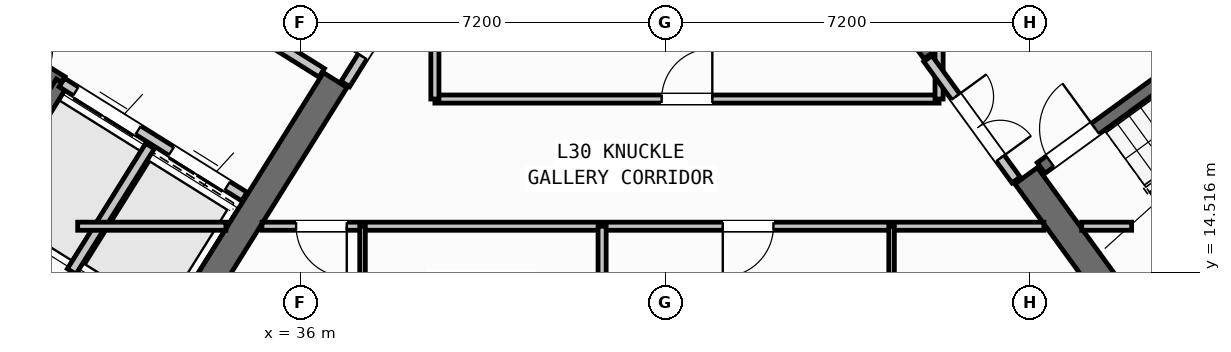
"""IFC4 building model, lengths in metres.
Left out: names, types, materials, properties, quantities, classifications, styles, units other than length and angle.
Written with IfcOpenShell. Run it as: python <this file> out.ifc"""

import sys

from ifc_helpers import new_model, si_unit, direction, frame, frame_2d, origin, place, context, subcontext, project, spatial, rectangle, extrude, source, transform, mapped, element, fill, save


model = new_model("IFC4")
c1 = context("Model", 3, precision=1e-05, world=origin(), true_north=direction((0.0, 1.0)))
c2 = subcontext(c1, "Body", "Model", "MODEL_VIEW")
j1 = project(units=[si_unit("LENGTHUNIT", "METRE"), si_unit("PLANEANGLEUNIT", "RADIAN")], contexts=[c1])
p1 = place(None, origin())
s1 = spatial("IfcSite", under=j1, at=p1, CompositionType="ELEMENT")
p2 = place(p1, origin())
s2 = spatial("IfcBuilding", under=s1, at=p2, CompositionType="ELEMENT")
p3 = place(p2, frame((0.0, 0.0, 119.7)))
s3 = spatial("IfcBuildingStorey", under=s2, at=p3, CompositionType="ELEMENT", Elevation=119.7)
p4 = place(p3, frame((33.366, 12.477, 0.0), z_axis=(0.0, 0.0, 1.0), x_axis=(-0.848047359947, 0.529920442413, 0.0)))
e1 = element("IfcWall", 1, at=p4, inside=s3, PredefinedType="SHEAR", context=c2, shape_type="SweptSolid", body=[
    extrude(rectangle(XDim=13.14, YDim=0.55, at=frame_2d((6.57, 0.0))), origin(), (0.0, 0.0, 1.0), 3.35),
])
p5 = place(p3, frame((36.683, 18.304, 0.0), z_axis=(0.0, 0.0, 1.0), x_axis=(-0.529896466841, -0.848062341122, 0.0)))
e2 = element("IfcWall", 2, at=p5, inside=s3, PredefinedType="SHEAR", context=c2, shape_type="SweptSolid", body=[
    extrude(rectangle(XDim=6.425, YDim=0.55, at=frame_2d((3.212, 0.0))), origin(), (0.0, 0.0, 1.0), 3.35),
])
p6 = place(p3, frame((52.359, 13.14, 0.0), z_axis=(0.0, 0.0, 1.0), x_axis=(0.809014896919, 0.587788139183, 0.0)))
e3 = element("IfcWall", 3, at=p6, inside=s3, PredefinedType="SHEAR", context=c2, shape_type="SweptSolid", body=[
    extrude(rectangle(XDim=12.34, YDim=0.55, at=frame_2d((6.17, 0.0))), origin(), (0.0, 0.0, 1.0), 3.35),
])
p7 = place(p3, frame((52.42, 13.524, 0.0), z_axis=(0.0, 0.0, 1.0), x_axis=(-0.587802113096, 0.809004744015, 0.0)))
e4 = element("IfcWall", 4, at=p7, inside=s3, PredefinedType="SHEAR", context=c2, shape_type="SweptSolid", body=[
    extrude(rectangle(XDim=3.575, YDim=0.55, at=frame_2d((1.788, 0.0))), origin(), (0.0, 0.0, 1.0), 3.35),
])
p8 = place(p3, frame((48.526, 18.884, 0.0), z_axis=(0.0, 0.0, 1.0), x_axis=(-0.587764933797, 0.809031756236, 0.0)))
e5 = element("IfcWall", 5, at=p8, inside=s3, PredefinedType="SHEAR", context=c2, shape_type="SweptSolid", body=[
    extrude(rectangle(XDim=6.425, YDim=0.55, at=frame_2d((3.212, 0.0))), origin(), (0.0, 0.0, 1.0), 3.35),
])
p9 = place(p3, frame((31.76, 12.183, 0.0), z_axis=(0.0, 0.0, 1.0), x_axis=(-0.848047074256, 0.529920899612, 0.0)))
e6 = element("IfcWall", 6, at=p9, inside=s3, PredefinedType="STANDARD", context=c2, shape_type="SweptSolid", body=[
    extrude(rectangle(XDim=30.652, YDim=0.32, at=frame_2d((15.326, 0.0))), origin(), (0.0, 0.0, 1.0), 3.35),
])
p10 = place(p9, frame((15.153, 0.0, 0.0)))
e7 = element("IfcOpeningElement", 7, at=p10, cuts=e6, PredefinedType="OPENING", context=c2, shape_type="SweptSolid", body=[
    extrude(rectangle(XDim=1.2, YDim=2.15, at=frame_2d((0.6, 1.075))), frame((0.0, 0.17, 0.0), z_axis=(0.0, -1.0, 0.0), x_axis=(1.0, 0.0, 0.0)), (0.0, 0.0, 1.0), 0.34),
])
p11 = place(p9, frame((2.002, 0.0, 0.8)))
e8 = element("IfcOpeningElement", 8, at=p11, cuts=e6, PredefinedType="OPENING", context=c2, shape_type="SweptSolid", body=[
    extrude(rectangle(XDim=2.1, YDim=1.55, at=frame_2d((1.05, 0.775))), frame((0.0, 0.17, 0.0), z_axis=(0.0, -1.0, 0.0), x_axis=(1.0, 0.0, 0.0)), (0.0, 0.0, 1.0), 0.34),
])
p12 = place(p9, frame((7.206, 0.0, 0.8)))
e9 = element("IfcOpeningElement", 9, at=p12, cuts=e6, PredefinedType="OPENING", context=c2, shape_type="SweptSolid", body=[
    extrude(rectangle(XDim=2.1, YDim=1.55, at=frame_2d((1.05, 0.775))), frame((0.0, 0.17, 0.0), z_axis=(0.0, -1.0, 0.0), x_axis=(1.0, 0.0, 0.0)), (0.0, 0.0, 1.0), 0.34),
])
p13 = place(p9, frame((12.648, 0.0, 1.0)))
e10 = element("IfcOpeningElement", 10, at=p13, cuts=e6, PredefinedType="OPENING", context=c2, shape_type="SweptSolid", body=[
    extrude(rectangle(XDim=0.9, YDim=1.25, at=frame_2d((0.45, 0.625))), frame((0.0, 0.17, 0.0), z_axis=(0.0, -1.0, 0.0), x_axis=(1.0, 0.0, 0.0)), (0.0, 0.0, 1.0), 0.34),
])
p14 = place(p9, frame((19.458, 0.0, 0.95)))
e11 = element("IfcOpeningElement", 11, at=p14, cuts=e6, PredefinedType="OPENING", context=c2, shape_type="SweptSolid", body=[
    extrude(rectangle(XDim=1.2, YDim=1.4, at=frame_2d((0.6, 0.7))), frame((0.0, 0.17, 0.0), z_axis=(0.0, -1.0, 0.0), x_axis=(1.0, 0.0, 0.0)), (0.0, 0.0, 1.0), 0.34),
])
p15 = place(p9, frame((21.858, 0.0, 0.95)))
e12 = element("IfcOpeningElement", 12, at=p15, cuts=e6, PredefinedType="OPENING", context=c2, shape_type="SweptSolid", body=[
    extrude(rectangle(XDim=1.2, YDim=1.4, at=frame_2d((0.6, 0.7))), frame((0.0, 0.17, 0.0), z_axis=(0.0, -1.0, 0.0), x_axis=(1.0, 0.0, 0.0)), (0.0, 0.0, 1.0), 0.34),
])
p16 = place(p9, frame((27.266, 0.0, 0.8)))
e13 = element("IfcOpeningElement", 13, at=p16, cuts=e6, PredefinedType="OPENING", context=c2, shape_type="SweptSolid", body=[
    extrude(rectangle(XDim=2.1, YDim=1.55, at=frame_2d((1.05, 0.775))), frame((0.0, 0.17, 0.0), z_axis=(0.0, -1.0, 0.0), x_axis=(1.0, 0.0, 0.0)), (0.0, 0.0, 1.0), 0.34),
])
p17 = place(p3, frame((31.28, 18.261, 0.0), z_axis=(0.0, 0.0, 1.0), x_axis=(-0.848051618787, 0.529913626805, 0.0)))
e14 = element("IfcWall", 14, at=p17, inside=s3, PredefinedType="SHEAR", context=c2, shape_type="SweptSolid", body=[
    extrude(rectangle(XDim=7.46, YDim=0.26, at=frame_2d((3.73, 0.0))), origin(), (0.0, 0.0, 1.0), 3.35),
])
p18 = place(p17, frame((0.36, 0.0, 0.0)))
e15 = element("IfcOpeningElement", 15, at=p18, cuts=e14, PredefinedType="OPENING", context=c2, shape_type="SweptSolid", body=[
    extrude(rectangle(XDim=0.86, YDim=2.05, at=frame_2d((0.43, 1.025))), frame((0.0, 0.14, 0.0), z_axis=(0.0, -1.0, 0.0), x_axis=(1.0, 0.0, 0.0)), (0.0, 0.0, 1.0), 0.28),
])
p19 = place(p3, frame((31.288, 18.256, 0.0), z_axis=(0.0, 0.0, 1.0), x_axis=(-0.529943379326, -0.848033026897, 0.0)))
e16 = element("IfcWall", 16, at=p19, inside=s3, PredefinedType="SHEAR", context=c2, shape_type="SweptSolid", body=[
    extrude(rectangle(XDim=3.16, YDim=0.26, at=frame_2d((1.58, 0.0))), origin(), (0.0, 0.0, 1.0), 3.35),
])
p20 = place(p3, frame((34.891, 16.005, 0.0), z_axis=(0.0, 0.0, 1.0), x_axis=(-0.848062873452, 0.529895614884, 0.0)))
e17 = element("IfcWall", 17, at=p20, inside=s3, PredefinedType="STANDARD", context=c2, shape_type="SweptSolid", body=[
    extrude(rectangle(XDim=4.248, YDim=0.2, at=frame_2d((2.124, 0.0))), origin(), (0.0, 0.0, 1.0), 3.34),
])
p21 = place(p20, frame((0.398, 0.0, 0.0)))
e18 = element("IfcOpeningElement", 18, at=p21, cuts=e17, PredefinedType="OPENING", context=c2, shape_type="SweptSolid", body=[
    extrude(rectangle(XDim=1.3, YDim=2.2, at=frame_2d((0.65, 1.1))), frame((0.0, 0.11, 0.0), z_axis=(0.0, -1.0, 0.0), x_axis=(1.0, 0.0, 0.0)), (0.0, 0.0, 1.0), 0.22),
])
p22 = place(p20, frame((2.473, 0.0, 0.0)))
e19 = element("IfcOpeningElement", 19, at=p22, cuts=e17, PredefinedType="OPENING", context=c2, shape_type="SweptSolid", body=[
    extrude(rectangle(XDim=1.45, YDim=2.25, at=frame_2d((0.725, 1.125))), frame((0.0, 0.11, 0.0), z_axis=(0.0, -1.0, 0.0), x_axis=(1.0, 0.0, 0.0)), (0.0, 0.0, 1.0), 0.22),
])
p23 = place(p3, frame((36.417, 18.447, 0.0), z_axis=(0.0, 0.0, 1.0), x_axis=(-0.848064879198, 0.529892404805, 0.0)))
e20 = element("IfcWall", 20, at=p23, inside=s3, PredefinedType="STANDARD", context=c2, shape_type="SweptSolid", body=[
    extrude(rectangle(XDim=5.768, YDim=0.2, at=frame_2d((2.884, 0.0))), origin(), (0.0, 0.0, 1.0), 3.34),
])
p24 = place(p23, frame((2.548, 0.0, 0.0)))
e21 = element("IfcOpeningElement", 21, at=p24, cuts=e20, PredefinedType="OPENING", context=c2, shape_type="SweptSolid", body=[
    extrude(rectangle(XDim=1.15, YDim=2.1, at=frame_2d((0.575, 1.05))), frame((0.0, 0.11, 0.0), z_axis=(0.0, -1.0, 0.0), x_axis=(1.0, 0.0, 0.0)), (0.0, 0.0, 1.0), 0.22),
])
p25 = place(p3, frame((33.029, 17.003, 0.0), z_axis=(0.0, 0.0, 1.0), x_axis=(-0.529916267533, -0.848049968695, 0.0)))
e22 = element("IfcWall", 22, at=p25, inside=s3, PredefinedType="STANDARD", context=c2, shape_type="SweptSolid", body=[
    extrude(rectangle(XDim=2.92, YDim=0.2, at=frame_2d((1.46, 0.0))), origin(), (0.0, 0.0, 1.0), 3.34),
])
p26 = place(p3, frame((52.472, 14.013, 0.0), z_axis=(0.0, 0.0, 1.0), x_axis=(0.809028366311, 0.587769599847, 0.0)))
e23 = element("IfcWall", 23, at=p26, inside=s3, PredefinedType="SHEAR", context=c2, shape_type="SweptSolid", body=[
    extrude(rectangle(XDim=7.33, YDim=0.26, at=frame_2d((3.665, 0.0))), origin(), (0.0, 0.0, 1.0), 3.35),
])
p27 = place(p3, frame((50.615, 16.57, 0.0), z_axis=(0.0, 0.0, 1.0), x_axis=(0.809028366311, 0.587769599847, 0.0)))
e24 = element("IfcWall", 24, at=p27, inside=s3, PredefinedType="SHEAR", context=c2, shape_type="SweptSolid", body=[
    extrude(rectangle(XDim=7.33, YDim=0.26, at=frame_2d((3.665, 0.0))), origin(), (0.0, 0.0, 1.0), 3.35),
])
p28 = place(p27, frame((0.22, 0.0, 0.0)))
e25 = element("IfcOpeningElement", 25, at=p28, cuts=e24, PredefinedType="OPENING", context=c2, shape_type="SweptSolid", body=[
    extrude(rectangle(XDim=1.1, YDim=2.1, at=frame_2d((0.55, 1.05))), frame((0.0, 0.14, 0.0), z_axis=(0.0, -1.0, 0.0), x_axis=(1.0, 0.0, 0.0)), (0.0, 0.0, 1.0), 0.28),
])
p29 = place(p3, frame((38.451, 20.737, 0.0), z_axis=(0.0, 0.0, 1.0), x_axis=(-0.529924799939, -0.848044637038, 0.0)))
e26 = element("IfcWall", 26, at=p29, inside=s3, PredefinedType="STANDARD", context=c2, shape_type="SweptSolid", body=[
    extrude(rectangle(XDim=2.96, YDim=0.2, at=frame_2d((1.48, 0.0))), origin(), (0.0, 0.0, 1.0), 3.34),
])
p30 = place(p29, frame((1.46, 0.0, 0.0)))
e27 = element("IfcOpeningElement", 27, at=p30, cuts=e26, PredefinedType="OPENING", context=c2, shape_type="SweptSolid", body=[
    extrude(rectangle(XDim=0.86, YDim=2.05, at=frame_2d((0.43, 1.025))), frame((0.0, 0.11, 0.0), z_axis=(0.0, -1.0, 0.0), x_axis=(1.0, 0.0, 0.0)), (0.0, 0.0, 1.0), 0.22),
])
p31 = place(p3, frame((31.6, 15.42, 0.0), z_axis=(0.0, 0.0, 1.0), x_axis=(1.0, 0.0, 0.0)))
e28 = element("IfcWall", 28, at=p31, inside=s3, PredefinedType="PARTITIONING", context=c2, shape_type="SweptSolid", body=[
    extrude(rectangle(XDim=2.925, YDim=0.16, at=frame_2d((1.462, 0.0))), origin(), (0.0, 0.0, 1.0), 3.34),
])
p32 = place(p3, frame((35.237, 15.42, 0.0), z_axis=(0.0, 0.0, 1.0), x_axis=(1.0, 0.0, 0.0)))
e29 = element("IfcWall", 29, at=p32, inside=s3, PredefinedType="PARTITIONING", context=c2, shape_type="SweptSolid", body=[
    extrude(rectangle(XDim=15.432, YDim=0.16, at=frame_2d((7.716, 0.0))), origin(), (0.0, 0.0, 1.0), 3.34),
])
p33 = place(p32, frame((0.674, 0.0, 0.0)))
e30 = element("IfcOpeningElement", 30, at=p33, cuts=e29, PredefinedType="OPENING", context=c2, shape_type="SweptSolid", body=[
    extrude(rectangle(XDim=1.0, YDim=2.1, at=frame_2d((0.5, 1.05))), frame((0.0, 0.09, 0.0), z_axis=(0.0, -1.0, 0.0), x_axis=(1.0, 0.0, 0.0)), (0.0, 0.0, 1.0), 0.18),
])
p34 = place(p32, frame((9.094, 0.0, 0.0)))
e31 = element("IfcOpeningElement", 31, at=p34, cuts=e29, PredefinedType="OPENING", context=c2, shape_type="SweptSolid", body=[
    extrude(rectangle(XDim=1.0, YDim=2.1, at=frame_2d((0.5, 1.05))), frame((0.0, 0.09, 0.0), z_axis=(0.0, -1.0, 0.0), x_axis=(1.0, 0.0, 0.0)), (0.0, 0.0, 1.0), 0.18),
])
p35 = place(p3, frame((51.416, 15.42, 0.0), z_axis=(0.0, 0.0, 1.0), x_axis=(1.0, 0.0, 0.0)))
e32 = element("IfcWall", 32, at=p35, inside=s3, PredefinedType="PARTITIONING", context=c2, shape_type="SweptSolid", body=[
    extrude(rectangle(XDim=0.984, YDim=0.16, at=frame_2d((0.492, 0.0))), origin(), (0.0, 0.0, 1.0), 3.34),
])
p36 = place(p3, frame((38.65, 17.93, 0.0), z_axis=(0.0, 0.0, 1.0), x_axis=(1.0, 0.0, 0.0)))
e33 = element("IfcWall", 33, at=p36, inside=s3, PredefinedType="PARTITIONING", context=c2, shape_type="SweptSolid", body=[
    extrude(rectangle(XDim=9.95, YDim=0.16, at=frame_2d((4.975, 0.0))), origin(), (0.0, 0.0, 1.0), 3.34),
])
p37 = place(p36, frame((4.475, 0.0, 0.0)))
e34 = element("IfcOpeningElement", 34, at=p37, cuts=e33, PredefinedType="OPENING", context=c2, shape_type="SweptSolid", body=[
    extrude(rectangle(XDim=1.0, YDim=2.1, at=frame_2d((0.5, 1.05))), frame((0.0, 0.09, 0.0), z_axis=(0.0, -1.0, 0.0), x_axis=(1.0, 0.0, 0.0)), (0.0, 0.0, 1.0), 0.18),
])
p38 = place(p3, frame((38.65, 17.93, 0.0), z_axis=(0.0, 0.0, 1.0), x_axis=(0.0, 1.0, 0.0)))
e35 = element("IfcWall", 35, at=p38, inside=s3, PredefinedType="PARTITIONING", context=c2, shape_type="SweptSolid", body=[
    extrude(rectangle(XDim=2.951, YDim=0.16, at=frame_2d((1.476, 0.0))), origin(), (0.0, 0.0, 1.0), 3.34),
])
p39 = place(p3, frame((48.6, 17.93, 0.0), z_axis=(0.0, 0.0, 1.0), x_axis=(0.0, 1.0, 0.0)))
e36 = element("IfcWall", 36, at=p39, inside=s3, PredefinedType="PARTITIONING", context=c2, shape_type="SweptSolid", body=[
    extrude(rectangle(XDim=0.993, YDim=0.16, at=frame_2d((0.496, 0.0))), origin(), (0.0, 0.0, 1.0), 3.34),
])
p40 = place(p3, frame((50.119, 16.333, 0.0), z_axis=(0.0, 0.0, 1.0), x_axis=(-0.587749856981, 0.809042709391, 0.0)))
e37 = element("IfcWall", 37, at=p40, inside=s3, PredefinedType="STANDARD", context=c2, shape_type="SweptSolid", body=[
    extrude(rectangle(XDim=2.96, YDim=0.2, at=frame_2d((1.48, 0.0))), origin(), (0.0, 0.0, 1.0), 3.34),
])
p41 = place(p40, frame((0.53, 0.0, 0.0)))
e38 = element("IfcOpeningElement", 38, at=p41, cuts=e37, PredefinedType="OPENING", context=c2, shape_type="SweptSolid", body=[
    extrude(rectangle(XDim=1.5, YDim=2.15, at=frame_2d((0.75, 1.075))), frame((0.0, 0.11, 0.0), z_axis=(0.0, -1.0, 0.0), x_axis=(1.0, 0.0, 0.0)), (0.0, 0.0, 1.0), 0.22),
])
p42 = place(p3, frame((41.95, 1.96, 0.0), z_axis=(0.0, 0.0, 1.0), x_axis=(0.0, 1.0, 0.0)))
e39 = element("IfcWall", 39, at=p42, inside=s3, PredefinedType="PARTITIONING", context=c2, shape_type="SweptSolid", body=[
    extrude(rectangle(XDim=13.46, YDim=0.16, at=frame_2d((6.73, 0.0))), origin(), (0.0, 0.0, 1.0), 3.34),
])
p43 = place(p3, frame((37.222, 1.96, 0.0), z_axis=(0.0, 0.0, 1.0), x_axis=(0.0, 1.0, 0.0)))
e40 = element("IfcWall", 40, at=p43, inside=s3, PredefinedType="PARTITIONING", context=c2, shape_type="SweptSolid", body=[
    extrude(rectangle(XDim=13.46, YDim=0.11, at=frame_2d((6.73, 0.0))), origin(), (0.0, 0.0, 1.0), 3.34),
])
p44 = place(p43, frame((5.2, 0.0, 0.0)))
e41 = element("IfcOpeningElement", 41, at=p44, cuts=e40, PredefinedType="OPENING", context=c2, shape_type="SweptSolid", body=[
    extrude(rectangle(XDim=0.92, YDim=2.08, at=frame_2d((0.46, 1.04))), frame((0.0, 0.065, 0.0), z_axis=(0.0, -1.0, 0.0), x_axis=(1.0, 0.0, 0.0)), (0.0, 0.0, 1.0), 0.13),
])
p45 = place(p43, frame((10.45, 0.0, 0.0)))
e42 = element("IfcOpeningElement", 42, at=p45, cuts=e40, PredefinedType="OPENING", context=c2, shape_type="SweptSolid", body=[
    extrude(rectangle(XDim=0.88, YDim=2.08, at=frame_2d((0.44, 1.04))), frame((0.0, 0.065, 0.0), z_axis=(0.0, -1.0, 0.0), x_axis=(1.0, 0.0, 0.0)), (0.0, 0.0, 1.0), 0.13),
])
p46 = place(p3, frame((47.663, 1.96, 0.0), z_axis=(0.0, 0.0, 1.0), x_axis=(0.0, 1.0, 0.0)))
e43 = element("IfcWall", 43, at=p46, inside=s3, PredefinedType="PARTITIONING", context=c2, shape_type="SweptSolid", body=[
    extrude(rectangle(XDim=13.46, YDim=0.11, at=frame_2d((6.73, 0.0))), origin(), (0.0, 0.0, 1.0), 3.34),
])
p47 = place(p46, frame((6.3, 0.0, 0.0)))
e44 = element("IfcOpeningElement", 44, at=p47, cuts=e43, PredefinedType="OPENING", context=c2, shape_type="SweptSolid", body=[
    extrude(rectangle(XDim=0.92, YDim=2.08, at=frame_2d((0.46, 1.04))), frame((0.0, 0.065, 0.0), z_axis=(0.0, -1.0, 0.0), x_axis=(1.0, 0.0, 0.0)), (0.0, 0.0, 1.0), 0.13),
])
p48 = place(p46, frame((11.1, 0.0, 0.0)))
e45 = element("IfcOpeningElement", 45, at=p48, cuts=e43, PredefinedType="OPENING", context=c2, shape_type="SweptSolid", body=[
    extrude(rectangle(XDim=0.88, YDim=2.08, at=frame_2d((0.44, 1.04))), frame((0.0, 0.065, 0.0), z_axis=(0.0, -1.0, 0.0), x_axis=(1.0, 0.0, 0.0)), (0.0, 0.0, 1.0), 0.13),
])
m1 = source(origin(), c2, "Body", "SweptSolid", [
    extrude(rectangle(XDim=1.3, YDim=2.2, at=frame_2d((0.65, 1.1))), frame((0.0, 0.025, 0.0), z_axis=(0.0, -1.0, 0.0), x_axis=(1.0, 0.0, 0.0)), (0.0, 0.0, 1.0), 0.05),
])
p49 = place(p21, origin())
e46 = element("IfcDoor", 46, at=p49, inside=s3, OperationType="DOUBLE_DOOR_SLIDING", PredefinedType="DOOR", context=c2, shape_type="MappedRepresentation", body=[
    mapped(m1, transform((0.0, 0.0, 0.0), scale=1.0)),
])
fill(e18, e46)
m2 = source(origin(), c2, "Body", "SweptSolid", [
    extrude(rectangle(XDim=1.45, YDim=2.25, at=frame_2d((0.725, 1.125))), frame((0.0, 0.025, 0.0), z_axis=(0.0, -1.0, 0.0), x_axis=(1.0, 0.0, 0.0)), (0.0, 0.0, 1.0), 0.05),
])
p50 = place(p22, origin())
e47 = element("IfcDoor", 47, at=p50, inside=s3, OperationType="DOUBLE_DOOR_SLIDING", PredefinedType="DOOR", context=c2, shape_type="MappedRepresentation", body=[
    mapped(m2, transform((0.0, 0.0, 0.0), scale=1.0)),
])
fill(e19, e47)
m3 = source(origin(), c2, "Body", "SweptSolid", [
    extrude(rectangle(XDim=1.1, YDim=2.1, at=frame_2d((0.55, 1.05))), frame((0.0, 0.025, 0.0), z_axis=(0.0, -1.0, 0.0), x_axis=(1.0, 0.0, 0.0)), (0.0, 0.0, 1.0), 0.05),
])
p51 = place(p28, origin())
e48 = element("IfcDoor", 48, at=p51, inside=s3, OperationType="SINGLE_SWING_RIGHT", PredefinedType="DOOR", context=c2, shape_type="MappedRepresentation", body=[
    mapped(m3, transform((0.0, 0.0, 0.0), scale=1.0)),
])
fill(e25, e48)
m4 = source(origin(), c2, "Body", "SweptSolid", [
    extrude(rectangle(XDim=1.0, YDim=2.1, at=frame_2d((0.5, 1.05))), frame((0.0, 0.025, 0.0), z_axis=(0.0, -1.0, 0.0), x_axis=(1.0, 0.0, 0.0)), (0.0, 0.0, 1.0), 0.05),
])
p52 = place(p37, origin())
e49 = element("IfcDoor", 49, at=p52, inside=s3, OperationType="SINGLE_SWING_RIGHT", PredefinedType="DOOR", context=c2, shape_type="MappedRepresentation", body=[
    mapped(m4, transform((0.0, 0.0, 0.0), scale=1.0)),
])
fill(e34, e49)
m5 = source(origin(), c2, "Body", "SweptSolid", [
    extrude(rectangle(XDim=0.86, YDim=2.05, at=frame_2d((0.43, 1.025))), frame((0.0, 0.025, 0.0), z_axis=(0.0, -1.0, 0.0), x_axis=(1.0, 0.0, 0.0)), (0.0, 0.0, 1.0), 0.05),
])
p53 = place(p30, frame((0.86, 0.0, 0.0), z_axis=(0.0, 0.0, 1.0), x_axis=(-1.0, 0.0, 0.0)))
e50 = element("IfcDoor", 50, at=p53, inside=s3, OperationType="SINGLE_SWING_LEFT", PredefinedType="DOOR", context=c2, shape_type="MappedRepresentation", body=[
    mapped(m5, transform((0.0, 0.0, 0.0), scale=1.0)),
])
fill(e27, e50)
m6 = source(origin(), c2, "Body", "SweptSolid", [
    extrude(rectangle(XDim=1.5, YDim=2.15, at=frame_2d((0.75, 1.075))), frame((0.0, 0.025, 0.0), z_axis=(0.0, -1.0, 0.0), x_axis=(1.0, 0.0, 0.0)), (0.0, 0.0, 1.0), 0.05),
])
p54 = place(p41, frame((1.5, 0.0, 0.0), z_axis=(0.0, 0.0, 1.0), x_axis=(-1.0, 0.0, 0.0)))
e51 = element("IfcDoor", 51, at=p54, inside=s3, OperationType="DOUBLE_DOOR_SINGLE_SWING", PredefinedType="DOOR", context=c2, shape_type="MappedRepresentation", body=[
    mapped(m6, transform((0.0, 0.0, 0.0), scale=1.0)),
])
fill(e38, e51)
p55 = place(p33, frame((1.0, 0.0, 0.0), z_axis=(0.0, 0.0, 1.0), x_axis=(-1.0, 0.0, 0.0)))
e52 = element("IfcDoor", 52, at=p55, inside=s3, OperationType="SINGLE_SWING_LEFT", PredefinedType="DOOR", context=c2, shape_type="MappedRepresentation", body=[
    mapped(m4, transform((0.0, 0.0, 0.0), scale=1.0)),
])
fill(e30, e52)
p56 = place(p34, frame((1.0, 0.0, 0.0), z_axis=(0.0, 0.0, 1.0), x_axis=(-1.0, 0.0, 0.0)))
e53 = element("IfcDoor", 53, at=p56, inside=s3, OperationType="SINGLE_SWING_RIGHT", PredefinedType="DOOR", context=c2, shape_type="MappedRepresentation", body=[
    mapped(m4, transform((0.0, 0.0, 0.0), scale=1.0)),
])
fill(e31, e53)
save(model, sys.argv[1])
